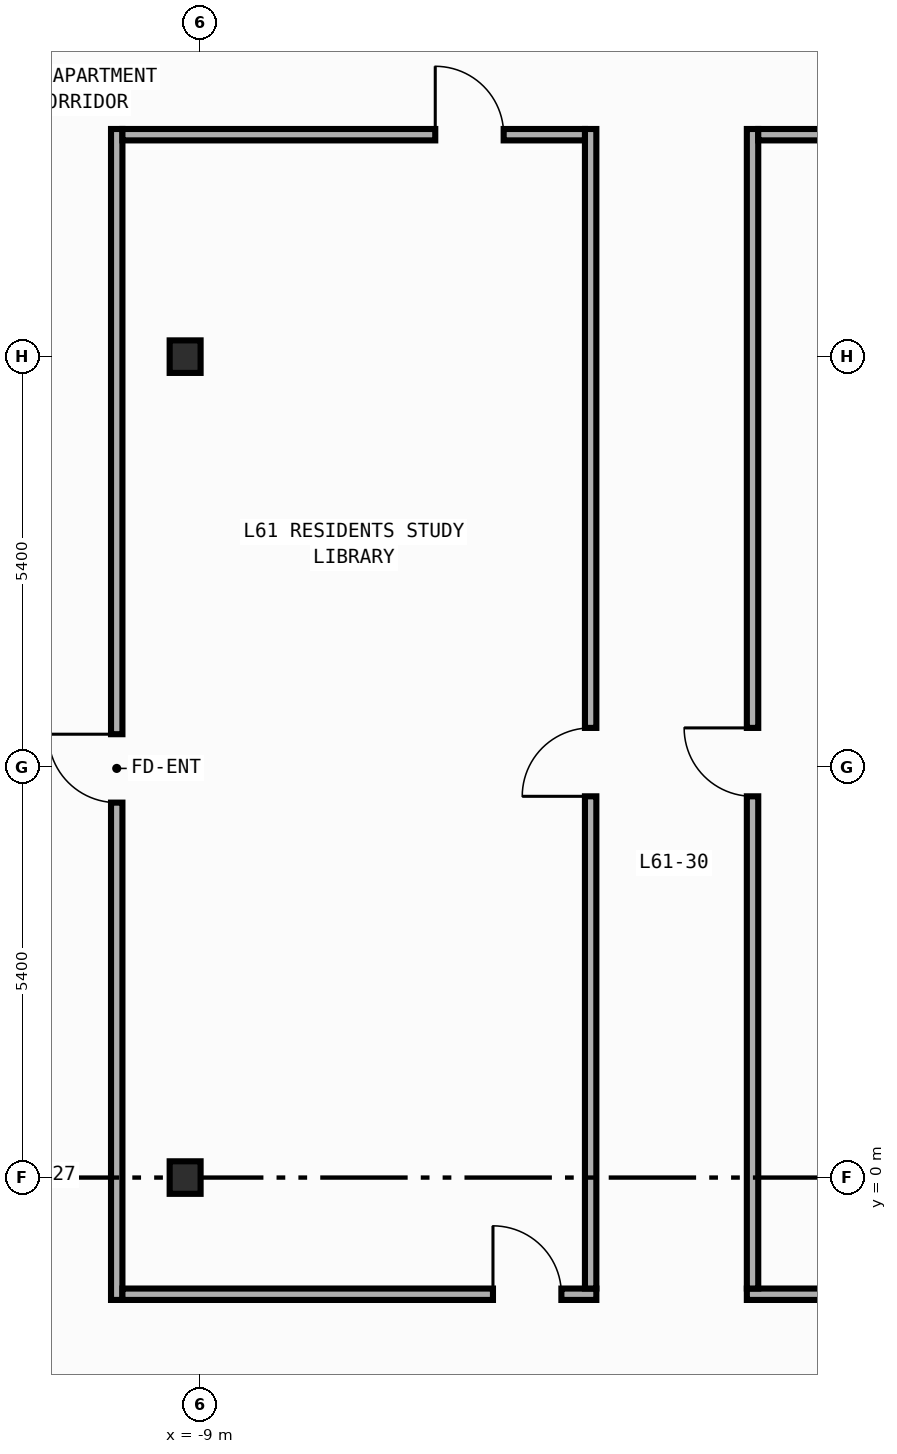
"""IFC4 building model, lengths in metres.
Left out: names, types, materials, properties, quantities, classifications, styles, units other than length and angle.
Written with IfcOpenShell. Run it as: python <this file> out.ifc"""

import sys

from ifc_helpers import new_model, si_unit, direction, frame, frame_2d, origin, origin_2d, place, context, subcontext, project, spatial, rectangle, i_section, extrude, element, fill, save


model = new_model("IFC4")
c1 = context("Model", 3, precision=1e-05, world=origin(), true_north=direction((0.0, 1.0)))
c2 = subcontext(c1, "Body", "Model", "MODEL_VIEW")
j1 = project(units=[si_unit("LENGTHUNIT", "METRE"), si_unit("PLANEANGLEUNIT", "RADIAN")], contexts=[c1])
p1 = place(None, origin())
s1 = spatial("IfcSite", under=j1, at=p1, CompositionType="ELEMENT")
p2 = place(p1, origin())
s2 = spatial("IfcBuilding", under=s1, at=p2, CompositionType="ELEMENT")
p3 = place(p2, frame((0.0, 0.0, 258.4)))
s3 = spatial("IfcBuildingStorey", under=s2, at=p3, CompositionType="ELEMENT", Elevation=258.4)
for number, where, z_axis, x_axis in (
    (1, (-9.2, 0.0, 0.0), (0.0, 0.0, 1.0), (1.0, 0.0, 0.0)),
    (2, (-9.2, 10.8, 0.0), (0.0, 0.0, 1.0), (1.0, 0.0, 0.0)),
):
    element("IfcColumn", number, at=place(p3, frame(where, z_axis=z_axis, x_axis=x_axis)), inside=s3, PredefinedType="COLUMN", context=c2, shape_type="SweptSolid", body=[
        extrude(i_section(OverallWidth=0.407, OverallDepth=0.428, WebThickness=0.02, FlangeThickness=0.035, FilletRadius=0.022, at=origin_2d()), origin(), (0.0, 0.0, 1.0), 3.6),
    ])
p4 = place(p3, frame((-10.1, -1.61, 0.0), z_axis=(0.0, 0.0, 1.0), x_axis=(0.0, 1.0, 0.0)))
e3 = element("IfcWall", 3, at=p4, inside=s3, PredefinedType="PARTITIONING", context=c2, shape_type="SweptSolid", body=[
    extrude(rectangle(XDim=15.405, YDim=0.15, at=frame_2d((7.703, 0.0))), origin(), (0.0, 0.0, 1.0), 3.34),
])
p5 = place(p4, frame((6.543, 0.0, 0.0)))
e4 = element("IfcOpeningElement", 4, at=p5, cuts=e3, PredefinedType="OPENING", context=c2, shape_type="SweptSolid", body=[
    extrude(rectangle(XDim=0.9, YDim=2.15, at=frame_2d((0.45, 1.075))), frame((0.0, 0.085, 0.0), z_axis=(0.0, -1.0, 0.0), x_axis=(1.0, 0.0, 0.0)), (0.0, 0.0, 1.0), 0.17),
])
p6 = place(p3, frame((-10.025, -1.535, 0.0), z_axis=(0.0, 0.0, 1.0), x_axis=(1.0, 0.0, 0.0)))
e5 = element("IfcWall", 5, at=p6, inside=s3, PredefinedType="PARTITIONING", context=c2, shape_type="SweptSolid", body=[
    extrude(rectangle(XDim=6.235, YDim=0.15, at=frame_2d((3.117, 0.0))), origin(), (0.0, 0.0, 1.0), 3.34),
])
p7 = place(p6, frame((4.875, 0.0, 0.0)))
e6 = element("IfcOpeningElement", 6, at=p7, cuts=e5, PredefinedType="OPENING", context=c2, shape_type="SweptSolid", body=[
    extrude(rectangle(XDim=0.9, YDim=2.15, at=frame_2d((0.45, 1.075))), frame((0.0, 0.085, 0.0), z_axis=(0.0, -1.0, 0.0), x_axis=(1.0, 0.0, 0.0)), (0.0, 0.0, 1.0), 0.17),
])
p8 = place(p3, frame((-1.81, -1.535, 0.0), z_axis=(0.0, 0.0, 1.0), x_axis=(1.0, 0.0, 0.0)))
e7 = element("IfcWall", 7, at=p8, inside=s3, PredefinedType="PARTITIONING", context=c2, shape_type="SweptSolid", body=[
    extrude(rectangle(XDim=11.835, YDim=0.15, at=frame_2d((5.917, 0.0))), origin(), (0.0, 0.0, 1.0), 3.34),
])
p9 = place(p8, frame((1.261, 0.0, 0.0)))
e8 = element("IfcOpeningElement", 8, at=p9, cuts=e7, PredefinedType="OPENING", context=c2, shape_type="SweptSolid", body=[
    extrude(rectangle(XDim=0.9, YDim=2.15, at=frame_2d((0.45, 1.075))), frame((0.0, 0.085, 0.0), z_axis=(0.0, -1.0, 0.0), x_axis=(1.0, 0.0, 0.0)), (0.0, 0.0, 1.0), 0.17),
])
p10 = place(p3, frame((-3.865, -1.46, 0.0), z_axis=(0.0, 0.0, 1.0), x_axis=(0.0, 1.0, 0.0)))
e9 = element("IfcWall", 9, at=p10, inside=s3, PredefinedType="PARTITIONING", context=c2, shape_type="SweptSolid", body=[
    extrude(rectangle(XDim=15.255, YDim=0.15, at=frame_2d((7.627, 0.0))), origin(), (0.0, 0.0, 1.0), 3.34),
])
p11 = place(p10, frame((6.476, 0.0, 0.0)))
e10 = element("IfcOpeningElement", 10, at=p11, cuts=e9, PredefinedType="OPENING", context=c2, shape_type="SweptSolid", body=[
    extrude(rectangle(XDim=0.9, YDim=2.15, at=frame_2d((0.45, 1.075))), frame((0.0, 0.085, 0.0), z_axis=(0.0, -1.0, 0.0), x_axis=(1.0, 0.0, 0.0)), (0.0, 0.0, 1.0), 0.17),
])
p12 = place(p3, frame((-1.735, -1.46, 0.0), z_axis=(0.0, 0.0, 1.0), x_axis=(0.0, 1.0, 0.0)))
e11 = element("IfcWall", 11, at=p12, inside=s3, PredefinedType="PARTITIONING", context=c2, shape_type="SweptSolid", body=[
    extrude(rectangle(XDim=15.255, YDim=0.15, at=frame_2d((7.627, 0.0))), origin(), (0.0, 0.0, 1.0), 3.34),
])
p13 = place(p12, frame((6.476, 0.0, 0.0)))
e12 = element("IfcOpeningElement", 12, at=p13, cuts=e11, PredefinedType="OPENING", context=c2, shape_type="SweptSolid", body=[
    extrude(rectangle(XDim=0.9, YDim=2.15, at=frame_2d((0.45, 1.075))), frame((0.0, 0.085, 0.0), z_axis=(0.0, -1.0, 0.0), x_axis=(1.0, 0.0, 0.0)), (0.0, 0.0, 1.0), 0.17),
])
p14 = place(p3, frame((-10.025, 13.72, 0.0), z_axis=(0.0, 0.0, 1.0), x_axis=(1.0, 0.0, 0.0)))
e13 = element("IfcWall", 13, at=p14, inside=s3, PredefinedType="PARTITIONING", context=c2, shape_type="SweptSolid", body=[
    extrude(rectangle(XDim=6.085, YDim=0.15, at=frame_2d((3.042, 0.0))), origin(), (0.0, 0.0, 1.0), 3.34),
])
p15 = place(p14, frame((4.116, 0.0, 0.0)))
e14 = element("IfcOpeningElement", 14, at=p15, cuts=e13, PredefinedType="OPENING", context=c2, shape_type="SweptSolid", body=[
    extrude(rectangle(XDim=0.9, YDim=2.15, at=frame_2d((0.45, 1.075))), frame((0.0, 0.085, 0.0), z_axis=(0.0, -1.0, 0.0), x_axis=(1.0, 0.0, 0.0)), (0.0, 0.0, 1.0), 0.17),
])
p16 = place(p3, frame((-1.66, 13.72, 0.0), z_axis=(0.0, 0.0, 1.0), x_axis=(1.0, 0.0, 0.0)))
e15 = element("IfcWall", 15, at=p16, inside=s3, PredefinedType="PARTITIONING", context=c2, shape_type="SweptSolid", body=[
    extrude(rectangle(XDim=11.685, YDim=0.15, at=frame_2d((5.842, 0.0))), origin(), (0.0, 0.0, 1.0), 3.34),
])
p17 = place(p16, frame((3.48, 0.0, 0.0)))
e16 = element("IfcOpeningElement", 16, at=p17, cuts=e15, PredefinedType="OPENING", context=c2, shape_type="SweptSolid", body=[
    extrude(rectangle(XDim=0.9, YDim=2.15, at=frame_2d((0.45, 1.075))), frame((0.0, 0.085, 0.0), z_axis=(0.0, -1.0, 0.0), x_axis=(1.0, 0.0, 0.0)), (0.0, 0.0, 1.0), 0.17),
])
p18 = place(p5, origin())
e17 = element("IfcDoor", 17, at=p18, inside=s3, OperationType="SINGLE_SWING_RIGHT", PredefinedType="DOOR", context=c2, shape_type="SweptSolid", body=[
    extrude(rectangle(XDim=0.9, YDim=2.15, at=frame_2d((0.45, 1.075))), frame((0.0, 0.025, 0.0), z_axis=(0.0, -1.0, 0.0), x_axis=(1.0, 0.0, 0.0)), (0.0, 0.0, 1.0), 0.05),
])
fill(e4, e17)
p19 = place(p7, origin())
e18 = element("IfcDoor", 18, at=p19, inside=s3, OperationType="SINGLE_SWING_LEFT", PredefinedType="DOOR", context=c2, shape_type="SweptSolid", body=[
    extrude(rectangle(XDim=0.9, YDim=2.15, at=frame_2d((0.45, 1.075))), frame((0.0, 0.025, 0.0), z_axis=(0.0, -1.0, 0.0), x_axis=(1.0, 0.0, 0.0)), (0.0, 0.0, 1.0), 0.05),
])
fill(e6, e18)
p20 = place(p11, origin())
e19 = element("IfcDoor", 19, at=p20, inside=s3, OperationType="SINGLE_SWING_LEFT", PredefinedType="DOOR", context=c2, shape_type="SweptSolid", body=[
    extrude(rectangle(XDim=0.9, YDim=2.15, at=frame_2d((0.45, 1.075))), frame((0.0, 0.025, 0.0), z_axis=(0.0, -1.0, 0.0), x_axis=(1.0, 0.0, 0.0)), (0.0, 0.0, 1.0), 0.05),
])
fill(e10, e19)
p21 = place(p13, origin())
e20 = element("IfcDoor", 20, at=p21, inside=s3, OperationType="SINGLE_SWING_RIGHT", PredefinedType="DOOR", context=c2, shape_type="SweptSolid", body=[
    extrude(rectangle(XDim=0.9, YDim=2.15, at=frame_2d((0.45, 1.075))), frame((0.0, 0.025, 0.0), z_axis=(0.0, -1.0, 0.0), x_axis=(1.0, 0.0, 0.0)), (0.0, 0.0, 1.0), 0.05),
])
fill(e12, e20)
p22 = place(p15, origin())
e21 = element("IfcDoor", 21, at=p22, inside=s3, OperationType="SINGLE_SWING_LEFT", PredefinedType="DOOR", context=c2, shape_type="SweptSolid", body=[
    extrude(rectangle(XDim=0.9, YDim=2.15, at=frame_2d((0.45, 1.075))), frame((0.0, 0.025, 0.0), z_axis=(0.0, -1.0, 0.0), x_axis=(1.0, 0.0, 0.0)), (0.0, 0.0, 1.0), 0.05),
])
fill(e14, e21)
save(model, sys.argv[1])
